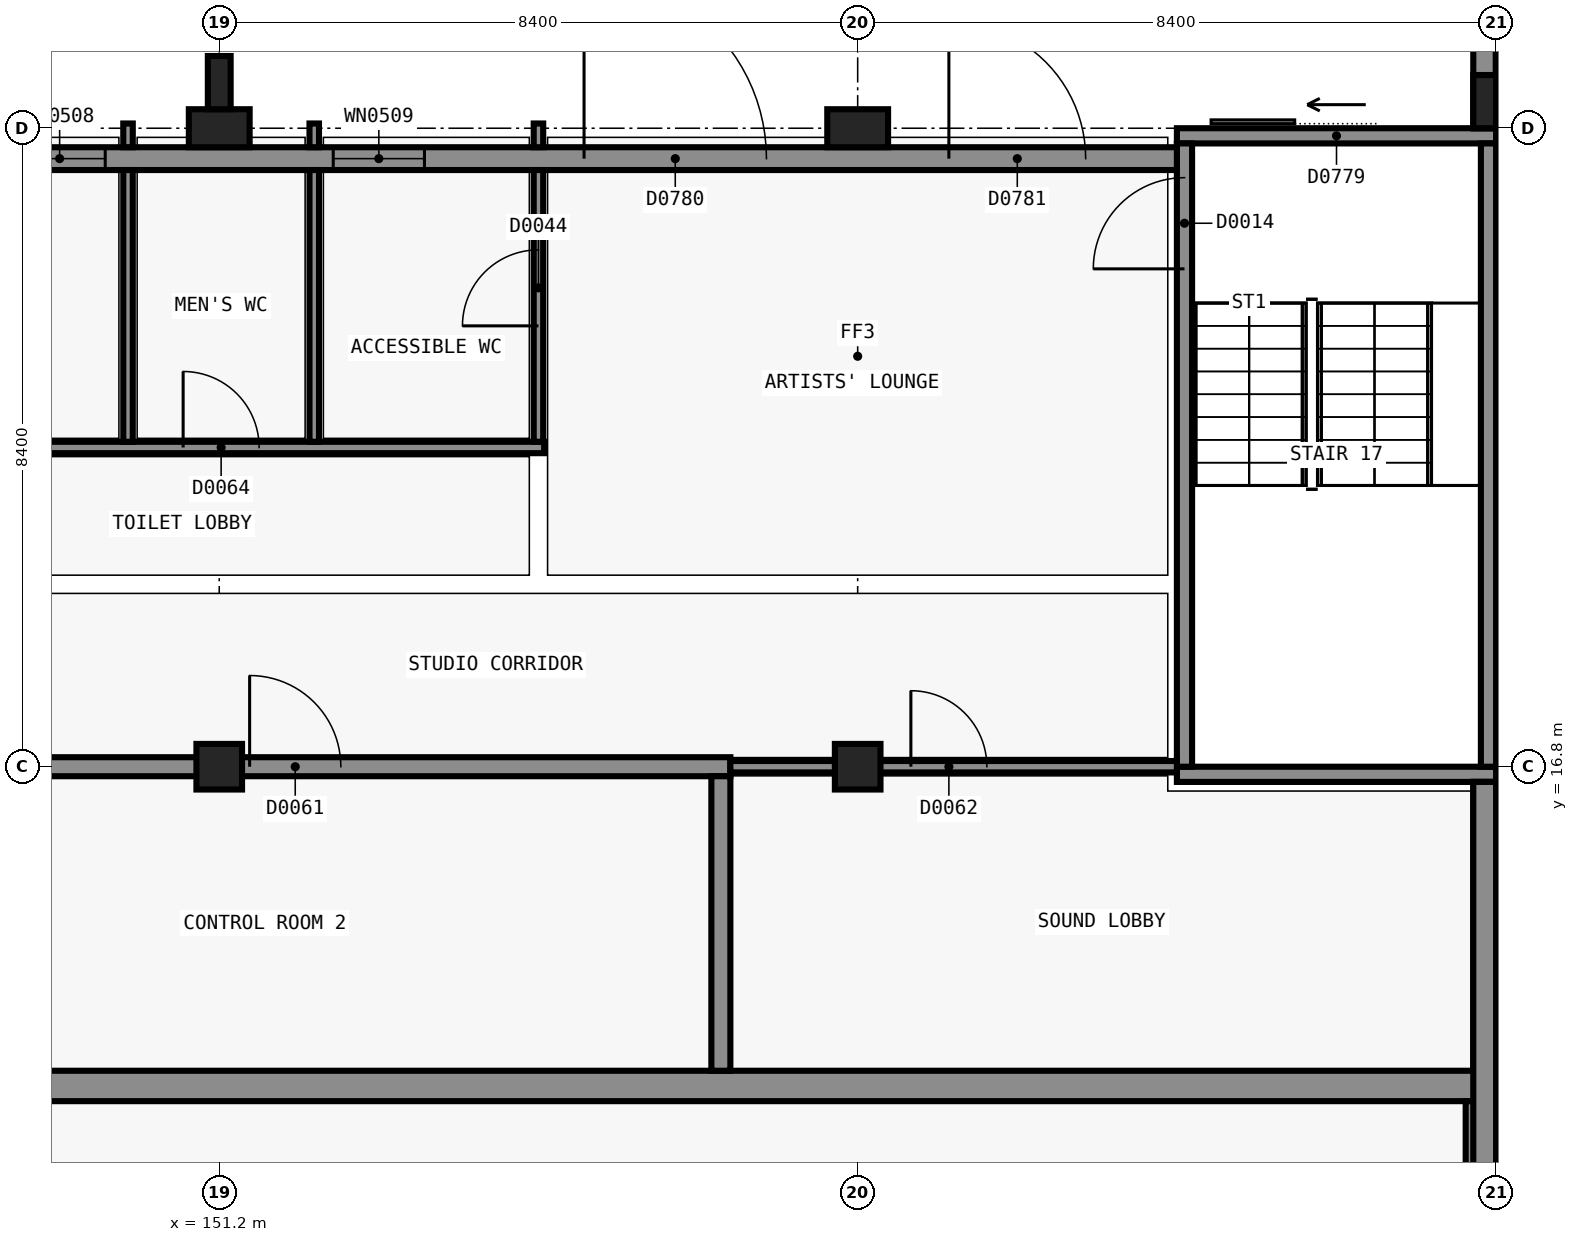
"""IFC4 building model, lengths in metres.
Left out: names, types, materials, properties, quantities, classifications, styles, units other than length and angle.
Written with IfcOpenShell. Run it as: python <this file> out.ifc"""

import sys

from ifc_helpers import new_model, si_unit, direction, frame, frame_2d, origin, origin_2d, place, context, subcontext, project, spatial, rectangle, extrude, element, fill, save


model = new_model("IFC4")
c1 = context("Model", 3, precision=1e-05, world=origin(), true_north=direction((0.0, 1.0)))
c2 = subcontext(c1, "Body", "Model", "MODEL_VIEW")
j1 = project(units=[si_unit("LENGTHUNIT", "METRE"), si_unit("PLANEANGLEUNIT", "RADIAN")], contexts=[c1])
p1 = place(None, origin())
s1 = spatial("IfcSite", under=j1, at=p1, CompositionType="ELEMENT")
p2 = place(p1, origin())
s2 = spatial("IfcBuilding", under=s1, at=p2, CompositionType="ELEMENT")
p3 = place(p2, origin())
s3 = spatial("IfcBuildingStorey", under=s2, at=p3, CompositionType="ELEMENT", Elevation=0.0)
p4 = place(p3, frame((168.0, 16.7, -0.3), z_axis=(0.0, 0.0, 1.0), x_axis=(-1.0, 0.0, 0.0)))
e1 = element("IfcWall", 1, at=p4, inside=s3, PredefinedType="SHEAR", context=c2, shape_type="SweptSolid", body=[
    extrude(rectangle(XDim=4.199, YDim=0.2, at=frame_2d((2.1, 0.0))), origin(), (0.0, 0.0, 1.0), 5.7),
])
p5 = place(p3, frame((163.8, 25.1, -0.3), z_axis=(0.0, 0.0, 1.0), x_axis=(1.0, 0.0, 0.0)))
e2 = element("IfcWall", 2, at=p5, inside=s3, PredefinedType="SHEAR", context=c2, shape_type="SweptSolid", body=[
    extrude(rectangle(XDim=4.199, YDim=0.2, at=frame_2d((2.1, 0.0))), origin(), (0.0, 0.0, 1.0), 5.7),
])
p6 = place(p5, frame((1.55, 0.0, 0.0)))
e3 = element("IfcOpeningElement", 3, at=p6, cuts=e2, PredefinedType="OPENING", context=c2, shape_type="SweptSolid", body=[
    extrude(rectangle(XDim=1.1, YDim=2.2, at=frame_2d((0.55, 1.1))), frame((0.0, 0.11, 0.0), z_axis=(0.0, -1.0, 0.0), x_axis=(1.0, 0.0, 0.0)), (0.0, 0.0, 1.0), 0.22),
])
p7 = place(p3, frame((163.9, 16.8, -0.3), z_axis=(0.0, 0.0, 1.0), x_axis=(0.0, 1.0, 0.0)))
e4 = element("IfcWall", 4, at=p7, inside=s3, PredefinedType="SHEAR", context=c2, shape_type="SweptSolid", body=[
    extrude(rectangle(XDim=8.2, YDim=0.2, at=frame_2d((4.1, 0.0))), origin(), (0.0, 0.0, 1.0), 5.7),
])
p8 = place(p7, frame((6.55, 0.0, 0.3)))
e5 = element("IfcOpeningElement", 5, at=p8, cuts=e4, PredefinedType="OPENING", context=c2, shape_type="SweptSolid", body=[
    extrude(rectangle(XDim=1.2, YDim=2.1, at=frame_2d((0.6, 1.05))), frame((0.0, 0.11, 0.0), z_axis=(0.0, -1.0, 0.0), x_axis=(1.0, 0.0, 0.0)), (0.0, 0.0, 1.0), 0.22),
])
p9 = place(p3, frame((167.9, 25.0, -0.3), z_axis=(0.0, 0.0, 1.0), x_axis=(0.0, -1.0, 0.0)))
e6 = element("IfcWall", 6, at=p9, inside=s3, PredefinedType="SHEAR", context=c2, shape_type="SweptSolid", body=[
    extrude(rectangle(XDim=8.2, YDim=0.2, at=frame_2d((4.1, 0.0))), origin(), (0.0, 0.0, 1.0), 5.7),
])
p10 = place(p3, frame((143.0, 12.6, -0.3), z_axis=(0.0, 0.0, 1.0), x_axis=(1.0, 0.0, 0.0)))
e7 = element("IfcWall", 7, at=p10, inside=s3, PredefinedType="SHEAR", context=c2, shape_type="SweptSolid", body=[
    extrude(rectangle(XDim=25.0, YDim=0.4, at=frame_2d((12.5, 0.0))), origin(), (0.0, 0.0, 1.0), 5.7),
])
p11 = place(p10, frame((0.4, 0.0, 0.3)))
e8 = element("IfcOpeningElement", 8, at=p11, cuts=e7, PredefinedType="OPENING", context=c2, shape_type="SweptSolid", body=[
    extrude(rectangle(XDim=1.8, YDim=2.3, at=frame_2d((0.9, 1.15))), frame((0.0, 0.21, 0.0), z_axis=(0.0, -1.0, 0.0), x_axis=(1.0, 0.0, 0.0)), (0.0, 0.0, 1.0), 0.42),
])
p12 = place(p3, frame((167.8, 12.4, -0.3), z_axis=(0.0, 0.0, 1.0), x_axis=(0.0, -1.0, 0.0)))
e9 = element("IfcWall", 9, at=p12, inside=s3, PredefinedType="SHEAR", context=c2, shape_type="SweptSolid", body=[
    extrude(rectangle(XDim=12.0, YDim=0.4, at=frame_2d((6.0, 0.0))), origin(), (0.0, 0.0, 1.0), 5.7),
])
p13 = place(p3, frame((167.85, 16.6, -0.3), z_axis=(0.0, 0.0, 1.0), x_axis=(0.0, -1.0, 0.0)))
e10 = element("IfcWall", 10, at=p13, inside=s3, PredefinedType="SOLIDWALL", context=c2, shape_type="SweptSolid", body=[
    extrude(rectangle(XDim=3.8, YDim=0.3, at=frame_2d((1.9, 0.0))), origin(), (0.0, 0.0, 1.0), 5.7),
])
p14 = place(p3, frame((151.2, 16.8, -0.3), z_axis=(0.0, 0.0, 1.0), x_axis=(1.0, 0.0, 0.0)))
e11 = element("IfcColumn", 11, at=p14, inside=s3, PredefinedType="COLUMN", context=c2, shape_type="SweptSolid", body=[
    extrude(rectangle(XDim=0.6, YDim=0.6, at=origin_2d()), origin(), (0.0, 0.0, 1.0), 5.7),
])
p15 = place(p3, frame((151.2, 25.2, -0.3), z_axis=(0.0, 0.0, 1.0), x_axis=(1.0, 0.0, 0.0)))
e12 = element("IfcColumn", 12, at=p15, inside=s3, PredefinedType="COLUMN", context=c2, shape_type="SweptSolid", body=[
    extrude(rectangle(XDim=0.8, YDim=0.5, at=origin_2d()), origin(), (0.0, 0.0, 1.0), 5.7),
])
p16 = place(p3, frame((159.6, 16.8, -0.3), z_axis=(0.0, 0.0, 1.0), x_axis=(1.0, 0.0, 0.0)))
e13 = element("IfcColumn", 13, at=p16, inside=s3, PredefinedType="COLUMN", context=c2, shape_type="SweptSolid", body=[
    extrude(rectangle(XDim=0.6, YDim=0.6, at=origin_2d()), origin(), (0.0, 0.0, 1.0), 5.7),
])
p17 = place(p3, frame((159.6, 25.2, -0.3), z_axis=(0.0, 0.0, 1.0), x_axis=(1.0, 0.0, 0.0)))
e14 = element("IfcColumn", 14, at=p17, inside=s3, PredefinedType="COLUMN", context=c2, shape_type="SweptSolid", body=[
    extrude(rectangle(XDim=0.8, YDim=0.5, at=origin_2d()), origin(), (0.0, 0.0, 1.0), 5.7),
])
p18 = place(p3, frame((167.85, 16.6, -1.2), z_axis=(0.0, 0.0, 1.0), x_axis=(0.0, -1.0, 0.0)))
e15 = element("IfcWall", 15, at=p18, inside=s3, PredefinedType="SOLIDWALL", context=c2, shape_type="SweptSolid", body=[
    extrude(rectangle(XDim=6.3, YDim=0.3, at=frame_2d((3.15, 0.0))), origin(), (0.0, 0.0, 1.0), 0.9),
])
p19 = place(p3, frame((167.85, 33.6, -1.2), z_axis=(0.0, 0.0, 1.0), x_axis=(0.0, -1.0, 0.0)))
e16 = element("IfcWall", 16, at=p19, inside=s3, PredefinedType="SOLIDWALL", context=c2, shape_type="SweptSolid", body=[
    extrude(rectangle(XDim=8.4, YDim=0.3, at=frame_2d((4.2, 0.0))), origin(), (0.0, 0.0, 1.0), 0.9),
])
p20 = place(p3, frame((145.8, 24.8, 0.0), z_axis=(0.0, 0.0, 1.0), x_axis=(1.0, 0.0, 0.0)))
e17 = element("IfcWall", 17, at=p20, inside=s3, PredefinedType="SOLIDWALL", context=c2, shape_type="SweptSolid", body=[
    extrude(rectangle(XDim=18.0, YDim=0.3, at=frame_2d((9.0, 0.0))), origin(), (0.0, 0.0, 1.0), 5.1),
])
p21 = place(p20, frame((10.2, 0.0, 0.0)))
e18 = element("IfcOpeningElement", 18, at=p21, cuts=e17, PredefinedType="OPENING", context=c2, shape_type="SweptSolid", body=[
    extrude(rectangle(XDim=2.4, YDim=2.4, at=frame_2d((1.2, 1.2))), frame((0.0, 0.16, 0.0), z_axis=(0.0, -1.0, 0.0), x_axis=(1.0, 0.0, 0.0)), (0.0, 0.0, 1.0), 0.32),
])
p22 = place(p20, frame((15.0, 0.0, 0.0)))
e19 = element("IfcOpeningElement", 19, at=p22, cuts=e17, PredefinedType="OPENING", context=c2, shape_type="SweptSolid", body=[
    extrude(rectangle(XDim=1.8, YDim=2.2, at=frame_2d((0.9, 1.1))), frame((0.0, 0.16, 0.0), z_axis=(0.0, -1.0, 0.0), x_axis=(1.0, 0.0, 0.0)), (0.0, 0.0, 1.0), 0.32),
])
p23 = place(p20, frame((2.7, 0.0, 1.5)))
e20 = element("IfcOpeningElement", 20, at=p23, cuts=e17, PredefinedType="OPENING", context=c2, shape_type="SweptSolid", body=[
    extrude(rectangle(XDim=1.2, YDim=0.9, at=frame_2d((0.6, 0.45))), frame((0.0, 0.16, 0.0), z_axis=(0.0, -1.0, 0.0), x_axis=(1.0, 0.0, 0.0)), (0.0, 0.0, 1.0), 0.32),
])
p24 = place(p20, frame((6.9, 0.0, 1.5)))
e21 = element("IfcOpeningElement", 21, at=p24, cuts=e17, PredefinedType="OPENING", context=c2, shape_type="SweptSolid", body=[
    extrude(rectangle(XDim=1.2, YDim=0.9, at=frame_2d((0.6, 0.45))), frame((0.0, 0.16, 0.0), z_axis=(0.0, -1.0, 0.0), x_axis=(1.0, 0.0, 0.0)), (0.0, 0.0, 1.0), 0.32),
])
for number, where, z_axis, x_axis in (
    (22, (151.2, 25.8, -0.3), (0.0, 0.0, 1.0), (1.0, 0.0, 0.0)),
    (23, (167.85, 25.55, -0.3), (0.0, 0.0, 1.0), (1.0, 0.0, 0.0)),
):
    element("IfcColumn", number, at=place(p3, frame(where, z_axis=z_axis, x_axis=x_axis)), inside=s3, PredefinedType="PILASTER", context=c2, shape_type="SweptSolid", body=[
        extrude(rectangle(XDim=0.3, YDim=0.7, at=origin_2d()), origin(), (0.0, 0.0, 1.0), 5.7),
    ])
p25 = place(p3, frame((145.675, 16.8, 0.0), z_axis=(0.0, 0.0, 1.0), x_axis=(1.0, 0.0, 0.0)))
e24 = element("IfcWall", 24, at=p25, inside=s3, PredefinedType="PARTITIONING", context=c2, shape_type="SweptSolid", body=[
    extrude(rectangle(XDim=12.25, YDim=0.25, at=frame_2d((6.125, 0.0))), origin(), (0.0, 0.0, 1.0), 4.4),
])
p26 = place(p25, frame((5.925, 0.0, 0.0)))
e25 = element("IfcOpeningElement", 25, at=p26, cuts=e24, PredefinedType="OPENING", context=c2, shape_type="SweptSolid", body=[
    extrude(rectangle(XDim=1.2, YDim=2.1, at=frame_2d((0.6, 1.05))), frame((0.0, 0.135, 0.0), z_axis=(0.0, -1.0, 0.0), x_axis=(1.0, 0.0, 0.0)), (0.0, 0.0, 1.0), 0.27),
])
p27 = place(p3, frame((157.8, 12.8, 0.0), z_axis=(0.0, 0.0, 1.0), x_axis=(0.0, 1.0, 0.0)))
e26 = element("IfcWall", 26, at=p27, inside=s3, PredefinedType="PARTITIONING", context=c2, shape_type="SweptSolid", body=[
    extrude(rectangle(XDim=3.875, YDim=0.25, at=frame_2d((1.938, 0.0))), origin(), (0.0, 0.0, 1.0), 4.4),
])
p28 = place(p3, frame((157.925, 16.8, 0.0), z_axis=(0.0, 0.0, 1.0), x_axis=(1.0, 0.0, 0.0)))
e27 = element("IfcWall", 27, at=p28, inside=s3, PredefinedType="PARTITIONING", context=c2, shape_type="SweptSolid", body=[
    extrude(rectangle(XDim=5.875, YDim=0.15, at=frame_2d((2.938, 0.0))), origin(), (0.0, 0.0, 1.0), 4.4),
])
p29 = place(p28, frame((2.375, 0.0, 0.0)))
e28 = element("IfcOpeningElement", 28, at=p29, cuts=e27, PredefinedType="OPENING", context=c2, shape_type="SweptSolid", body=[
    extrude(rectangle(XDim=1.0, YDim=2.1, at=frame_2d((0.5, 1.05))), frame((0.0, 0.085, 0.0), z_axis=(0.0, -1.0, 0.0), x_axis=(1.0, 0.0, 0.0)), (0.0, 0.0, 1.0), 0.17),
])
p30 = place(p3, frame((145.725, 21.0, 0.0), z_axis=(0.0, 0.0, 1.0), x_axis=(1.0, 0.0, 0.0)))
e29 = element("IfcWall", 29, at=p30, inside=s3, PredefinedType="PARTITIONING", context=c2, shape_type="SweptSolid", body=[
    extrude(rectangle(XDim=9.75, YDim=0.15, at=frame_2d((4.875, 0.0))), origin(), (0.0, 0.0, 1.0), 4.4),
])
p31 = place(p30, frame((1.675, 0.0, 0.0)))
e30 = element("IfcOpeningElement", 30, at=p31, cuts=e29, PredefinedType="OPENING", context=c2, shape_type="SweptSolid", body=[
    extrude(rectangle(XDim=1.0, YDim=2.1, at=frame_2d((0.5, 1.05))), frame((0.0, 0.085, 0.0), z_axis=(0.0, -1.0, 0.0), x_axis=(1.0, 0.0, 0.0)), (0.0, 0.0, 1.0), 0.17),
])
p32 = place(p30, frame((5.0, 0.0, 0.0)))
e31 = element("IfcOpeningElement", 31, at=p32, cuts=e29, PredefinedType="OPENING", context=c2, shape_type="SweptSolid", body=[
    extrude(rectangle(XDim=1.0, YDim=2.1, at=frame_2d((0.5, 1.05))), frame((0.0, 0.085, 0.0), z_axis=(0.0, -1.0, 0.0), x_axis=(1.0, 0.0, 0.0)), (0.0, 0.0, 1.0), 0.17),
])
p33 = place(p3, frame((150.0, 21.075, 0.0), z_axis=(0.0, 0.0, 1.0), x_axis=(0.0, 1.0, 0.0)))
e32 = element("IfcWall", 32, at=p33, inside=s3, PredefinedType="PARTITIONING", context=c2, shape_type="SweptSolid", body=[
    extrude(rectangle(XDim=3.575, YDim=0.125, at=frame_2d((1.788, 0.0))), origin(), (0.0, 0.0, 1.0), 5.1),
])
p34 = place(p3, frame((150.0, 24.95, 0.0), z_axis=(0.0, 0.0, 1.0), x_axis=(0.0, 1.0, 0.0)))
e33 = element("IfcWall", 33, at=p34, inside=s3, PredefinedType="PARTITIONING", context=c2, shape_type="SweptSolid", body=[
    extrude(rectangle(XDim=0.312, YDim=0.125, at=frame_2d((0.156, 0.0))), origin(), (0.0, 0.0, 1.0), 4.6),
])
p35 = place(p3, frame((152.45, 21.075, 0.0), z_axis=(0.0, 0.0, 1.0), x_axis=(0.0, 1.0, 0.0)))
e34 = element("IfcWall", 34, at=p35, inside=s3, PredefinedType="PARTITIONING", context=c2, shape_type="SweptSolid", body=[
    extrude(rectangle(XDim=3.575, YDim=0.125, at=frame_2d((1.788, 0.0))), origin(), (0.0, 0.0, 1.0), 5.1),
])
p36 = place(p3, frame((152.45, 24.95, 0.0), z_axis=(0.0, 0.0, 1.0), x_axis=(0.0, 1.0, 0.0)))
e35 = element("IfcWall", 35, at=p36, inside=s3, PredefinedType="PARTITIONING", context=c2, shape_type="SweptSolid", body=[
    extrude(rectangle(XDim=0.312, YDim=0.125, at=frame_2d((0.156, 0.0))), origin(), (0.0, 0.0, 1.0), 4.4),
])
p37 = place(p3, frame((155.4, 21.075, 0.0), z_axis=(0.0, 0.0, 1.0), x_axis=(0.0, 1.0, 0.0)))
e36 = element("IfcWall", 36, at=p37, inside=s3, PredefinedType="PARTITIONING", context=c2, shape_type="SweptSolid", body=[
    extrude(rectangle(XDim=3.575, YDim=0.125, at=frame_2d((1.788, 0.0))), origin(), (0.0, 0.0, 1.0), 5.1),
])
p38 = place(p37, frame((1.525, 0.0, 0.0)))
e37 = element("IfcOpeningElement", 37, at=p38, cuts=e36, PredefinedType="OPENING", context=c2, shape_type="SweptSolid", body=[
    extrude(rectangle(XDim=1.0, YDim=2.1, at=frame_2d((0.5, 1.05))), frame((0.0, 0.073, 0.0), z_axis=(0.0, -1.0, 0.0), x_axis=(1.0, 0.0, 0.0)), (0.0, 0.0, 1.0), 0.145),
])
p39 = place(p3, frame((155.4, 24.95, 0.0), z_axis=(0.0, 0.0, 1.0), x_axis=(0.0, 1.0, 0.0)))
e38 = element("IfcWall", 38, at=p39, inside=s3, PredefinedType="PARTITIONING", context=c2, shape_type="SweptSolid", body=[
    extrude(rectangle(XDim=0.312, YDim=0.125, at=frame_2d((0.156, 0.0))), origin(), (0.0, 0.0, 1.0), 4.4),
])
p40 = place(p6, origin())
e39 = element("IfcDoor", 39, at=p40, inside=s3, OperationType="SLIDING_TO_LEFT", PredefinedType="DOOR", context=c2, shape_type="SweptSolid", body=[
    extrude(rectangle(XDim=1.1, YDim=2.2, at=frame_2d((0.55, 1.1))), frame((0.0, 0.025, 0.0), z_axis=(0.0, -1.0, 0.0), x_axis=(1.0, 0.0, 0.0)), (0.0, 0.0, 1.0), 0.05),
])
fill(e3, e39)
p41 = place(p21, origin())
e40 = element("IfcDoor", 40, at=p41, inside=s3, OperationType="DOUBLE_DOOR_DOUBLE_SWING", PredefinedType="DOOR", context=c2, shape_type="SweptSolid", body=[
    extrude(rectangle(XDim=2.4, YDim=2.4, at=frame_2d((1.2, 1.2))), frame((0.0, 0.025, 0.0), z_axis=(0.0, -1.0, 0.0), x_axis=(1.0, 0.0, 0.0)), (0.0, 0.0, 1.0), 0.05),
])
fill(e18, e40)
p42 = place(p22, origin())
e41 = element("IfcDoor", 41, at=p42, inside=s3, OperationType="SINGLE_SWING_RIGHT", PredefinedType="DOOR", context=c2, shape_type="SweptSolid", body=[
    extrude(rectangle(XDim=1.8, YDim=2.2, at=frame_2d((0.9, 1.1))), frame((0.0, 0.025, 0.0), z_axis=(0.0, -1.0, 0.0), x_axis=(1.0, 0.0, 0.0)), (0.0, 0.0, 1.0), 0.05),
])
fill(e19, e41)
p43 = place(p23, origin())
e42 = element("IfcWindow", 42, at=p43, inside=s3, PartitioningType="SINGLE_PANEL", PredefinedType="WINDOW", context=c2, shape_type="SweptSolid", body=[
    extrude(rectangle(XDim=1.2, YDim=0.9, at=frame_2d((0.6, 0.45))), frame((0.0, 0.03, 0.0), z_axis=(0.0, -1.0, 0.0), x_axis=(1.0, 0.0, 0.0)), (0.0, 0.0, 1.0), 0.06),
])
fill(e20, e42)
p44 = place(p24, origin())
e43 = element("IfcWindow", 43, at=p44, inside=s3, PartitioningType="SINGLE_PANEL", PredefinedType="WINDOW", context=c2, shape_type="SweptSolid", body=[
    extrude(rectangle(XDim=1.2, YDim=0.9, at=frame_2d((0.6, 0.45))), frame((0.0, 0.03, 0.0), z_axis=(0.0, -1.0, 0.0), x_axis=(1.0, 0.0, 0.0)), (0.0, 0.0, 1.0), 0.06),
])
fill(e21, e43)
p45 = place(p8, origin())
e44 = element("IfcDoor", 44, at=p45, inside=s3, OperationType="SINGLE_SWING_RIGHT", PredefinedType="DOOR", context=c2, shape_type="SweptSolid", body=[
    extrude(rectangle(XDim=1.2, YDim=2.1, at=frame_2d((0.6, 1.05))), frame((0.0, 0.025, 0.0), z_axis=(0.0, -1.0, 0.0), x_axis=(1.0, 0.0, 0.0)), (0.0, 0.0, 1.0), 0.05),
])
fill(e5, e44)
p46 = place(p38, origin())
e45 = element("IfcDoor", 45, at=p46, inside=s3, OperationType="SINGLE_SWING_RIGHT", PredefinedType="DOOR", context=c2, shape_type="SweptSolid", body=[
    extrude(rectangle(XDim=1.0, YDim=2.1, at=frame_2d((0.5, 1.05))), frame((0.0, 0.025, 0.0), z_axis=(0.0, -1.0, 0.0), x_axis=(1.0, 0.0, 0.0)), (0.0, 0.0, 1.0), 0.05),
])
fill(e37, e45)
p47 = place(p26, origin())
e46 = element("IfcDoor", 46, at=p47, inside=s3, OperationType="SINGLE_SWING_RIGHT", PredefinedType="DOOR", context=c2, shape_type="SweptSolid", body=[
    extrude(rectangle(XDim=1.2, YDim=2.1, at=frame_2d((0.6, 1.05))), frame((0.0, 0.025, 0.0), z_axis=(0.0, -1.0, 0.0), x_axis=(1.0, 0.0, 0.0)), (0.0, 0.0, 1.0), 0.05),
])
fill(e25, e46)
p48 = place(p29, origin())
e47 = element("IfcDoor", 47, at=p48, inside=s3, OperationType="SINGLE_SWING_RIGHT", PredefinedType="DOOR", context=c2, shape_type="SweptSolid", body=[
    extrude(rectangle(XDim=1.0, YDim=2.1, at=frame_2d((0.5, 1.05))), frame((0.0, 0.025, 0.0), z_axis=(0.0, -1.0, 0.0), x_axis=(1.0, 0.0, 0.0)), (0.0, 0.0, 1.0), 0.05),
])
fill(e28, e47)
p49 = place(p32, origin())
e48 = element("IfcDoor", 48, at=p49, inside=s3, OperationType="SINGLE_SWING_RIGHT", PredefinedType="DOOR", context=c2, shape_type="SweptSolid", body=[
    extrude(rectangle(XDim=1.0, YDim=2.1, at=frame_2d((0.5, 1.05))), frame((0.0, 0.025, 0.0), z_axis=(0.0, -1.0, 0.0), x_axis=(1.0, 0.0, 0.0)), (0.0, 0.0, 1.0), 0.05),
])
fill(e31, e48)
save(model, sys.argv[1])
